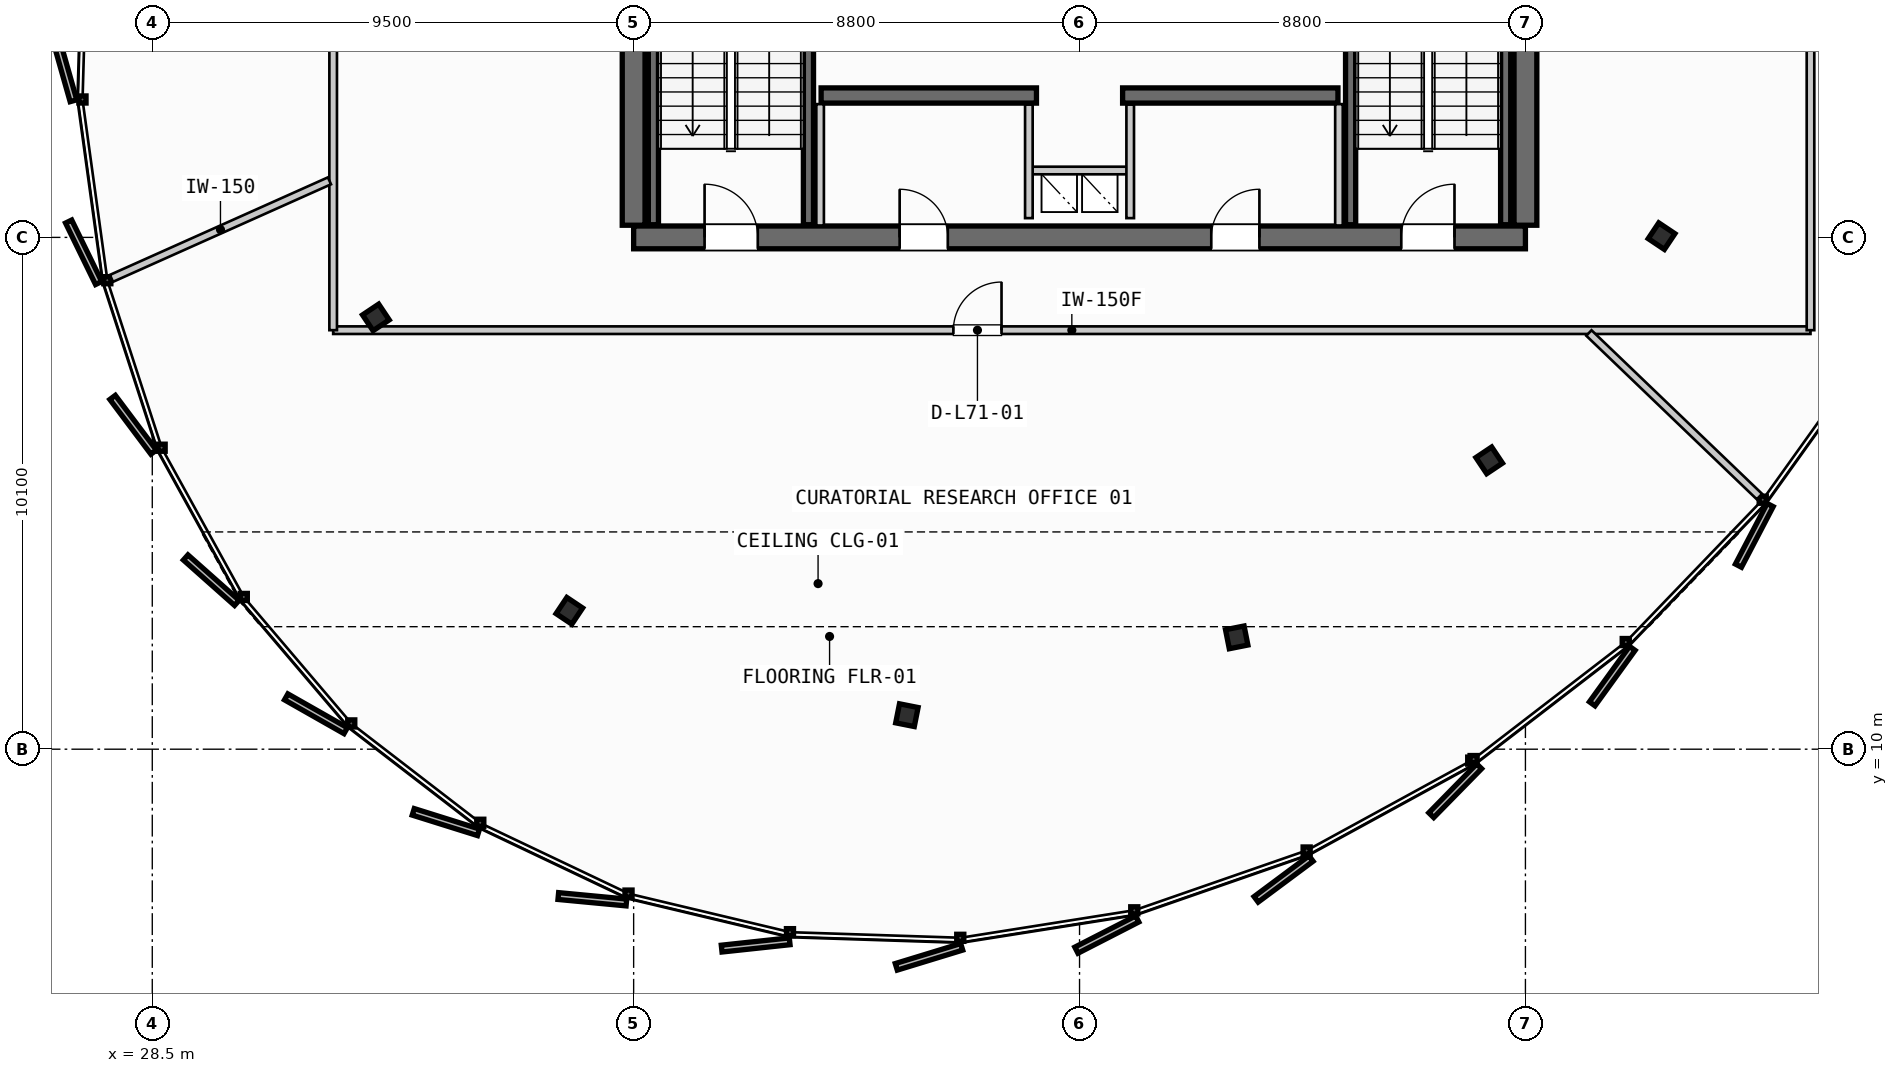
"""IFC4 building model, lengths in metres.
Left out: names, types, materials, properties, quantities, classifications, styles, units other than length and angle.
Written with IfcOpenShell. Run it as: python <this file> out.ifc"""

import sys

from ifc_helpers import new_model, si_unit, direction, frame, frame_2d, origin, origin_2d, place, context, subcontext, project, spatial, rectangle, i_section, extrude, source, transform, mapped, element, fill, save


model = new_model("IFC4")
c1 = context("Model", 3, precision=1e-05, world=origin(), true_north=direction((0.0, 1.0)))
c2 = subcontext(c1, "Body", "Model", "MODEL_VIEW")
j1 = project(units=[si_unit("LENGTHUNIT", "METRE"), si_unit("PLANEANGLEUNIT", "RADIAN")], contexts=[c1])
p1 = place(None, origin())
s1 = spatial("IfcSite", under=j1, at=p1, CompositionType="ELEMENT")
p2 = place(p1, origin())
s2 = spatial("IfcBuilding", under=s1, at=p2, CompositionType="ELEMENT")
p3 = place(p2, frame((0.0, 0.0, 269.8)))
s3 = spatial("IfcBuildingStorey", under=s2, at=p3, CompositionType="ELEMENT", Elevation=269.8)
p4 = place(p3, frame((38.0, 20.1, 0.0), z_axis=(0.0, 0.0, 1.0), x_axis=(1.0, 0.0, 0.0)))
e1 = element("IfcWall", 1, at=p4, inside=s3, PredefinedType="SHEAR", context=c2, shape_type="SweptSolid", body=[
    extrude(rectangle(XDim=17.6, YDim=0.45, at=frame_2d((8.8, 0.0))), origin(), (0.0, 0.0, 1.0), 3.21),
])
p5 = place(p4, frame((1.4, 0.0, 0.0)))
e2 = element("IfcOpeningElement", 2, at=p5, cuts=e1, PredefinedType="OPENING", context=c2, shape_type="SweptSolid", body=[
    extrude(rectangle(XDim=1.05, YDim=2.15, at=frame_2d((0.525, 1.075))), frame((0.0, 0.235, 0.0), z_axis=(0.0, -1.0, 0.0), x_axis=(1.0, 0.0, 0.0)), (0.0, 0.0, 1.0), 0.47),
])
p6 = place(p4, frame((15.15, 0.0, 0.0)))
e3 = element("IfcOpeningElement", 3, at=p6, cuts=e1, PredefinedType="OPENING", context=c2, shape_type="SweptSolid", body=[
    extrude(rectangle(XDim=1.05, YDim=2.15, at=frame_2d((0.525, 1.075))), frame((0.0, 0.235, 0.0), z_axis=(0.0, -1.0, 0.0), x_axis=(1.0, 0.0, 0.0)), (0.0, 0.0, 1.0), 0.47),
])
p7 = place(p4, frame((5.25, 0.0, 0.0)))
e4 = element("IfcOpeningElement", 4, at=p7, cuts=e1, PredefinedType="OPENING", context=c2, shape_type="SweptSolid", body=[
    extrude(rectangle(XDim=0.95, YDim=2.15, at=frame_2d((0.475, 1.075))), frame((0.0, 0.235, 0.0), z_axis=(0.0, -1.0, 0.0), x_axis=(1.0, 0.0, 0.0)), (0.0, 0.0, 1.0), 0.47),
])
p8 = place(p4, frame((11.4, 0.0, 0.0)))
e5 = element("IfcOpeningElement", 5, at=p8, cuts=e1, PredefinedType="OPENING", context=c2, shape_type="SweptSolid", body=[
    extrude(rectangle(XDim=0.95, YDim=2.15, at=frame_2d((0.475, 1.075))), frame((0.0, 0.235, 0.0), z_axis=(0.0, -1.0, 0.0), x_axis=(1.0, 0.0, 0.0)), (0.0, 0.0, 1.0), 0.47),
])
p9 = place(p3, frame((38.0, 35.26, 0.0), z_axis=(0.0, 0.0, 1.0), x_axis=(0.0, -1.0, 0.0)))
e6 = element("IfcWall", 6, at=p9, inside=s3, PredefinedType="SHEAR", context=c2, shape_type="SweptSolid", body=[
    extrude(rectangle(XDim=14.92, YDim=0.45, at=frame_2d((7.46, 0.0))), origin(), (0.0, 0.0, 1.0), 3.21),
])
p10 = place(p9, frame((5.21, 0.0, 0.0)))
e7 = element("IfcOpeningElement", 7, at=p10, cuts=e6, PredefinedType="OPENING", context=c2, shape_type="SweptSolid", body=[
    extrude(rectangle(XDim=1.1, YDim=2.2, at=frame_2d((0.55, 1.1))), frame((0.0, 0.235, 0.0), z_axis=(0.0, -1.0, 0.0), x_axis=(1.0, 0.0, 0.0)), (0.0, 0.0, 1.0), 0.47),
])
p11 = place(p3, frame((55.6, 20.34, 0.0), z_axis=(0.0, 0.0, 1.0), x_axis=(0.0, 1.0, 0.0)))
e8 = element("IfcWall", 8, at=p11, inside=s3, PredefinedType="SHEAR", context=c2, shape_type="SweptSolid", body=[
    extrude(rectangle(XDim=14.92, YDim=0.45, at=frame_2d((7.46, 0.0))), origin(), (0.0, 0.0, 1.0), 3.21),
])
p12 = place(p11, frame((12.71, 0.0, 0.0)))
e9 = element("IfcOpeningElement", 9, at=p12, cuts=e8, PredefinedType="OPENING", context=c2, shape_type="SweptSolid", body=[
    extrude(rectangle(XDim=1.05, YDim=2.15, at=frame_2d((0.525, 1.075))), frame((0.0, 0.235, 0.0), z_axis=(0.0, -1.0, 0.0), x_axis=(1.0, 0.0, 0.0)), (0.0, 0.0, 1.0), 0.47),
])
p13 = place(p11, frame((8.61, 0.0, 0.0)))
e10 = element("IfcOpeningElement", 10, at=p13, cuts=e8, PredefinedType="OPENING", context=c2, shape_type="SweptSolid", body=[
    extrude(rectangle(XDim=1.1, YDim=2.2, at=frame_2d((0.55, 1.1))), frame((0.0, 0.235, 0.0), z_axis=(0.0, -1.0, 0.0), x_axis=(1.0, 0.0, 0.0)), (0.0, 0.0, 1.0), 0.47),
])
for number, where, z_axis, x_axis in (
    (11, (41.7, 22.9, 0.0), (0.0, 0.0, 1.0), (1.0, 0.0, 0.0)),
    (12, (47.65, 22.9, 0.0), (0.0, 0.0, 1.0), (1.0, 0.0, 0.0)),
):
    element("IfcWall", number, at=place(p3, frame(where, z_axis=z_axis, x_axis=x_axis)), inside=s3, PredefinedType="SHEAR", context=c2, shape_type="SweptSolid", body=[
        extrude(rectangle(XDim=4.25, YDim=0.3, at=frame_2d((2.125, 0.0))), origin(), (0.0, 0.0, 1.0), 3.21),
    ])
m1 = source(origin(), c2, "Body", "SweptSolid", [
    extrude(i_section(OverallWidth=0.374, OverallDepth=0.383, WebThickness=0.017, FlangeThickness=0.026, FilletRadius=0.015, at=origin_2d()), origin(), (0.0, 0.0, 1.0), 3.21),
])
for number, where, z_axis, x_axis in (
    (13, (32.913, 18.521, 0.0), (0.0, 0.0, 1.0), (-0.831, -0.556, 0.0)),
    (14, (36.731, 12.731, 0.0), (0.0, 0.0, 1.0), (-0.556, -0.831, 0.0)),
    (15, (43.393, 10.671, 0.0), (0.0, 0.0, 1.0), (-0.195, -0.981, 0.0)),
    (16, (49.902, 12.207, 0.0), (0.0, 0.0, 1.0), (0.195, -0.981, 0.0)),
    (17, (54.885, 15.7, 0.0), (0.0, 0.0, 1.0), (0.556, -0.831, 0.0)),
    (18, (58.287, 20.125, 0.0), (0.0, 0.0, 1.0), (0.831, -0.556, 0.0)),
):
    element("IfcColumn", number, at=place(p3, frame(where, z_axis=z_axis, x_axis=x_axis)), inside=s3, PredefinedType="COLUMN", context=c2, shape_type="MappedRepresentation", body=[
        mapped(m1, transform((0.0, 0.0, 0.0), scale=1.0)),
    ])
for number, where, z_axis, x_axis in (
    (19, (41.45, 27.7, 0.0), (0.0, 0.0, 1.0), (0.0, -1.0, 0.0)),
    (20, (38.39, 20.35, 0.0), (0.0, 0.0, 1.0), (0.0, 1.0, 0.0)),
    (21, (55.21, 27.7, 0.0), (0.0, 0.0, 1.0), (0.0, -1.0, 0.0)),
    (22, (52.15, 20.35, 0.0), (0.0, 0.0, 1.0), (0.0, 1.0, 0.0)),
):
    element("IfcWall", number, at=place(p3, frame(where, z_axis=z_axis, x_axis=x_axis)), inside=s3, PredefinedType="SHEAR", context=c2, shape_type="SweptSolid", body=[
        extrude(rectangle(XDim=7.35, YDim=0.2, at=frame_2d((3.675, 0.0))), origin(), (0.0, 0.0, 1.0), 3.21),
    ])
p14 = place(p3, frame((45.8, 21.42, 0.0), z_axis=(0.0, 0.0, 1.0), x_axis=(1.0, 0.0, 0.0)))
e23 = element("IfcWall", 23, at=p14, inside=s3, PredefinedType="PARTITIONING", context=c2, shape_type="SweptSolid", body=[
    extrude(rectangle(XDim=2.0, YDim=0.15, at=frame_2d((1.0, 0.0))), origin(), (0.0, 0.0, 1.0), 2.595),
])
for number, where, z_axis, x_axis in (
    (24, (45.8, 20.48, 0.0), (0.0, 0.0, 1.0), (0.0, 1.0, 0.0)),
    (25, (47.8, 20.48, 0.0), (0.0, 0.0, 1.0), (0.0, 1.0, 0.0)),
):
    element("IfcWall", number, at=place(p3, frame(where, z_axis=z_axis, x_axis=x_axis)), inside=s3, PredefinedType="PARTITIONING", context=c2, shape_type="SweptSolid", body=[
        extrude(rectangle(XDim=2.24, YDim=0.15, at=frame_2d((1.12, 0.0))), origin(), (0.0, 0.0, 1.0), 2.595),
    ])
for number, where, z_axis, x_axis in (
    (26, (41.68, 20.335, 0.0), (0.0, 0.0, 1.0), (0.0, 1.0, 0.0)),
    (27, (51.92, 20.335, 0.0), (0.0, 0.0, 1.0), (0.0, 1.0, 0.0)),
):
    element("IfcWall", number, at=place(p3, frame(where, z_axis=z_axis, x_axis=x_axis)), inside=s3, PredefinedType="PARTITIONING", context=c2, shape_type="SweptSolid", body=[
        extrude(rectangle(XDim=2.395, YDim=0.15, at=frame_2d((1.198, 0.0))), origin(), (0.0, 0.0, 1.0), 2.595),
    ])
p15 = place(p3, frame((32.07, 18.269, 0.0), z_axis=(0.0, 0.0, 1.0), x_axis=(1.0, 0.0, 0.0)))
e28 = element("IfcWall", 28, at=p15, inside=s3, PredefinedType="PARTITIONING", context=c2, shape_type="SweptSolid", body=[
    extrude(rectangle(XDim=29.156, YDim=0.15, at=frame_2d((14.578, 0.0))), origin(), (0.0, 0.0, 1.0), 2.595),
])
p16 = place(p15, frame((12.24, 0.0, 0.0)))
e29 = element("IfcOpeningElement", 29, at=p16, cuts=e28, PredefinedType="OPENING", context=c2, shape_type="SweptSolid", body=[
    extrude(rectangle(XDim=0.95, YDim=2.15, at=frame_2d((0.475, 1.075))), frame((0.0, 0.085, 0.0), z_axis=(0.0, -1.0, 0.0), x_axis=(1.0, 0.0, 0.0)), (0.0, 0.0, 1.0), 0.17),
])
p17 = place(p3, frame((61.226, 18.269, 0.0), z_axis=(0.0, 0.0, 1.0), x_axis=(0.0, 1.0, 0.0)))
e30 = element("IfcWall", 30, at=p17, inside=s3, PredefinedType="PARTITIONING", context=c2, shape_type="SweptSolid", body=[
    extrude(rectangle(XDim=18.831, YDim=0.15, at=frame_2d((9.416, 0.0))), origin(), (0.0, 0.0, 1.0), 2.595),
])
p18 = place(p17, frame((8.125, 0.0, 0.0)))
e31 = element("IfcOpeningElement", 31, at=p18, cuts=e30, PredefinedType="OPENING", context=c2, shape_type="SweptSolid", body=[
    extrude(rectangle(XDim=0.95, YDim=2.15, at=frame_2d((0.475, 1.075))), frame((0.0, 0.085, 0.0), z_axis=(0.0, -1.0, 0.0), x_axis=(1.0, 0.0, 0.0)), (0.0, 0.0, 1.0), 0.17),
])
p19 = place(p3, frame((32.07, 37.1, 0.0), z_axis=(0.0, 0.0, 1.0), x_axis=(0.0, -1.0, 0.0)))
e32 = element("IfcWall", 32, at=p19, inside=s3, PredefinedType="PARTITIONING", context=c2, shape_type="SweptSolid", body=[
    extrude(rectangle(XDim=18.831, YDim=0.15, at=frame_2d((9.416, 0.0))), origin(), (0.0, 0.0, 1.0), 2.595),
])
p20 = place(p19, frame((7.754, 0.0, 0.0)))
e33 = element("IfcOpeningElement", 33, at=p20, cuts=e32, PredefinedType="OPENING", context=c2, shape_type="SweptSolid", body=[
    extrude(rectangle(XDim=0.95, YDim=2.15, at=frame_2d((0.475, 1.075))), frame((0.0, 0.085, 0.0), z_axis=(0.0, -1.0, 0.0), x_axis=(1.0, 0.0, 0.0)), (0.0, 0.0, 1.0), 0.17),
])
p21 = place(p3, frame((31.997, 21.216, 0.0), z_axis=(0.0, 0.0, 1.0), x_axis=(-0.912837051259, -0.408324035356, 0.0)))
e34 = element("IfcWall", 34, at=p21, inside=s3, PredefinedType="PARTITIONING", context=c2, shape_type="SweptSolid", body=[
    extrude(rectangle(XDim=4.713, YDim=0.15, at=frame_2d((2.357, 0.0))), origin(), (0.0, 0.0, 1.0), 2.595),
])
p22 = place(p3, frame((56.853, 18.214, 0.0), z_axis=(0.0, 0.0, 1.0), x_axis=(0.721715732621, -0.69218957034, 0.0)))
e35 = element("IfcWall", 35, at=p22, inside=s3, PredefinedType="PARTITIONING", context=c2, shape_type="SweptSolid", body=[
    extrude(rectangle(XDim=4.664, YDim=0.15, at=frame_2d((2.332, 0.0))), origin(), (0.0, 0.0, 1.0), 2.595),
])
m2 = source(origin(), c2, "Body", "SweptSolid", [
    extrude(rectangle(XDim=1.05, YDim=2.15, at=frame_2d((0.525, 1.075))), frame((0.0, 0.025, 0.0), z_axis=(0.0, -1.0, 0.0), x_axis=(1.0, 0.0, 0.0)), (0.0, 0.0, 1.0), 0.05),
])
p23 = place(p5, origin())
e36 = element("IfcDoor", 36, at=p23, inside=s3, OperationType="SINGLE_SWING_LEFT", PredefinedType="DOOR", context=c2, shape_type="MappedRepresentation", body=[
    mapped(m2, transform((0.0, 0.0, 0.0), scale=1.0)),
])
fill(e2, e36)
p24 = place(p6, origin())
e37 = element("IfcDoor", 37, at=p24, inside=s3, OperationType="SINGLE_SWING_RIGHT", PredefinedType="DOOR", context=c2, shape_type="MappedRepresentation", body=[
    mapped(m2, transform((0.0, 0.0, 0.0), scale=1.0)),
])
fill(e3, e37)
m3 = source(origin(), c2, "Body", "SweptSolid", [
    extrude(rectangle(XDim=0.95, YDim=2.15, at=frame_2d((0.475, 1.075))), frame((0.0, 0.025, 0.0), z_axis=(0.0, -1.0, 0.0), x_axis=(1.0, 0.0, 0.0)), (0.0, 0.0, 1.0), 0.05),
])
p25 = place(p7, origin())
e38 = element("IfcDoor", 38, at=p25, inside=s3, OperationType="SINGLE_SWING_LEFT", PredefinedType="DOOR", context=c2, shape_type="MappedRepresentation", body=[
    mapped(m3, transform((0.0, 0.0, 0.0), scale=1.0)),
])
fill(e4, e38)
p26 = place(p8, origin())
e39 = element("IfcDoor", 39, at=p26, inside=s3, OperationType="SINGLE_SWING_RIGHT", PredefinedType="DOOR", context=c2, shape_type="MappedRepresentation", body=[
    mapped(m3, transform((0.0, 0.0, 0.0), scale=1.0)),
])
fill(e5, e39)
p27 = place(p16, origin())
e40 = element("IfcDoor", 40, at=p27, inside=s3, OperationType="SINGLE_SWING_RIGHT", PredefinedType="DOOR", context=c2, shape_type="MappedRepresentation", body=[
    mapped(m3, transform((0.0, 0.0, 0.0), scale=1.0)),
])
fill(e29, e40)
save(model, sys.argv[1])
